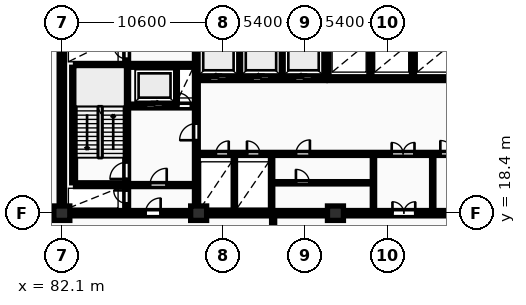
"""IFC4 building model, lengths in metres.
Left out: names, types, materials, properties, quantities, classifications, styles, units other than length and angle.
Written with IfcOpenShell. Run it as: python <this file> out.ifc"""

import sys

from ifc_helpers import new_model, si_unit, direction, frame, frame_2d, origin, origin_2d, place, context, subcontext, project, spatial, rectangle, extrude, element, fill, save


model = new_model("IFC4")
c1 = context("Model", 3, precision=1e-05, world=origin(), true_north=direction((0.0, 1.0)))
c2 = subcontext(c1, "Body", "Model", "MODEL_VIEW")
j1 = project(units=[si_unit("LENGTHUNIT", "METRE"), si_unit("PLANEANGLEUNIT", "RADIAN")], contexts=[c1])
p1 = place(None, origin())
s1 = spatial("IfcSite", under=j1, at=p1, CompositionType="ELEMENT")
p2 = place(p1, origin())
s2 = spatial("IfcBuilding", under=s1, at=p2, CompositionType="ELEMENT")
p3 = place(p2, frame((0.0, 0.0, 5.4)))
s3 = spatial("IfcBuildingStorey", under=s2, at=p3, CompositionType="ELEMENT", Elevation=5.4)
for number, where, z_axis, x_axis in (
    (1, (82.1, 18.4, 0.0), (0.0, 0.0, 1.0), (1.0, 0.0, 0.0)),
    (2, (91.1, 18.4, 0.0), (0.0, 0.0, 1.0), (1.0, 0.0, 0.0)),
    (3, (100.1, 18.4, 0.0), (0.0, 0.0, 1.0), (1.0, 0.0, 0.0)),
):
    element("IfcColumn", number, at=place(p3, frame(where, z_axis=z_axis, x_axis=x_axis)), inside=s3, PredefinedType="COLUMN", context=c2, shape_type="SweptSolid", body=[
        extrude(rectangle(XDim=1.05, YDim=0.95, at=origin_2d()), origin(), (0.0, 0.0, 1.0), 4.6),
    ])
p4 = place(p3, frame((82.1, 18.575, 0.0), z_axis=(0.0, 0.0, 1.0), x_axis=(0.0, 1.0, 0.0)))
e4 = element("IfcWall", 4, at=p4, inside=s3, PredefinedType="SHEAR", context=c2, shape_type="SweptSolid", body=[
    extrude(rectangle(XDim=11.65, YDim=0.35, at=frame_2d((5.825, 0.0))), origin(), (0.0, 0.0, 1.0), 4.6),
])
p5 = place(p3, frame((81.925, 18.4, 0.0), z_axis=(0.0, 0.0, 1.0), x_axis=(1.0, 0.0, 0.0)))
e5 = element("IfcWall", 5, at=p5, inside=s3, PredefinedType="SHEAR", context=c2, shape_type="SweptSolid", body=[
    extrude(rectangle(XDim=36.265, YDim=0.35, at=frame_2d((18.132, 0.0))), origin(), (0.0, 0.0, 1.0), 4.6),
])
p6 = place(p5, frame((5.675, 0.0, 0.0)))
e6 = element("IfcOpeningElement", 6, at=p6, cuts=e5, PredefinedType="OPENING", context=c2, shape_type="SweptSolid", body=[
    extrude(rectangle(XDim=1.0, YDim=2.15, at=frame_2d((0.5, 1.075))), frame((0.0, 0.185, 0.0), z_axis=(0.0, -1.0, 0.0), x_axis=(1.0, 0.0, 0.0)), (0.0, 0.0, 1.0), 0.37),
])
p7 = place(p5, frame((21.925, 0.0, 0.0)))
e7 = element("IfcOpeningElement", 7, at=p7, cuts=e5, PredefinedType="OPENING", context=c2, shape_type="SweptSolid", body=[
    extrude(rectangle(XDim=1.5, YDim=2.2, at=frame_2d((0.75, 1.1))), frame((0.0, 0.185, 0.0), z_axis=(0.0, -1.0, 0.0), x_axis=(1.0, 0.0, 0.0)), (0.0, 0.0, 1.0), 0.37),
])
p8 = place(p5, frame((29.875, 0.0, 0.0)))
e8 = element("IfcOpeningElement", 8, at=p8, cuts=e5, PredefinedType="OPENING", context=c2, shape_type="SweptSolid", body=[
    extrude(rectangle(XDim=1.0, YDim=2.15, at=frame_2d((0.5, 1.075))), frame((0.0, 0.185, 0.0), z_axis=(0.0, -1.0, 0.0), x_axis=(1.0, 0.0, 0.0)), (0.0, 0.0, 1.0), 0.37),
])
p9 = place(p3, frame((82.875, 20.4, 0.0), z_axis=(0.0, 0.0, 1.0), x_axis=(0.0, 1.0, 0.0)))
e9 = element("IfcWall", 9, at=p9, inside=s3, PredefinedType="SHEAR", context=c2, shape_type="SweptSolid", body=[
    extrude(rectangle(XDim=7.6, YDim=0.25, at=frame_2d((3.8, 0.0))), origin(), (0.0, 0.0, 1.0), 4.6),
])
p10 = place(p3, frame((86.365, 18.6, 0.0), z_axis=(0.0, 0.0, 1.0), x_axis=(0.0, 1.0, 0.0)))
e10 = element("IfcWall", 10, at=p10, inside=s3, PredefinedType="SHEAR", context=c2, shape_type="SweptSolid", body=[
    extrude(rectangle(XDim=11.6, YDim=0.25, at=frame_2d((5.8, 0.0))), origin(), (0.0, 0.0, 1.0), 4.6),
])
p11 = place(p10, frame((0.45, 0.0, 0.0)))
e11 = element("IfcOpeningElement", 11, at=p11, cuts=e10, PredefinedType="OPENING", context=c2, shape_type="SweptSolid", body=[
    extrude(rectangle(XDim=0.85, YDim=2.05, at=frame_2d((0.425, 1.025))), frame((0.0, 0.135, 0.0), z_axis=(0.0, -1.0, 0.0), x_axis=(1.0, 0.0, 0.0)), (0.0, 0.0, 1.0), 0.27),
])
p12 = place(p10, frame((2.05, 0.0, 0.0)))
e12 = element("IfcOpeningElement", 12, at=p12, cuts=e10, PredefinedType="OPENING", context=c2, shape_type="SweptSolid", body=[
    extrude(rectangle(XDim=1.1, YDim=2.1, at=frame_2d((0.55, 1.05))), frame((0.0, 0.135, 0.0), z_axis=(0.0, -1.0, 0.0), x_axis=(1.0, 0.0, 0.0)), (0.0, 0.0, 1.0), 0.27),
])
p13 = place(p10, frame((9.95, 0.0, 0.0)))
e13 = element("IfcOpeningElement", 13, at=p13, cuts=e10, PredefinedType="OPENING", context=c2, shape_type="SweptSolid", body=[
    extrude(rectangle(XDim=0.85, YDim=2.05, at=frame_2d((0.425, 1.025))), frame((0.0, 0.135, 0.0), z_axis=(0.0, -1.0, 0.0), x_axis=(1.0, 0.0, 0.0)), (0.0, 0.0, 1.0), 0.27),
])
p14 = place(p3, frame((83.0, 20.275, 0.0), z_axis=(0.0, 0.0, 1.0), x_axis=(1.0, 0.0, 0.0)))
e14 = element("IfcWall", 14, at=p14, inside=s3, PredefinedType="SHEAR", context=c2, shape_type="SweptSolid", body=[
    extrude(rectangle(XDim=3.24, YDim=0.25, at=frame_2d((1.62, 0.0))), origin(), (0.0, 0.0, 1.0), 4.6),
])
p15 = place(p3, frame((83.0, 28.125, 0.0), z_axis=(0.0, 0.0, 1.0), x_axis=(1.0, 0.0, 0.0)))
e15 = element("IfcWall", 15, at=p15, inside=s3, PredefinedType="SHEAR", context=c2, shape_type="SweptSolid", body=[
    extrude(rectangle(XDim=7.82, YDim=0.25, at=frame_2d((3.91, 0.0))), origin(), (0.0, 0.0, 1.0), 4.6),
])
p16 = place(p3, frame((86.5, 25.45, 0.0), z_axis=(0.0, 0.0, 1.0), x_axis=(1.0, 0.0, 0.0)))
e16 = element("IfcWall", 16, at=p16, inside=s3, PredefinedType="SHEAR", context=c2, shape_type="SweptSolid", body=[
    extrude(rectangle(XDim=4.32, YDim=0.25, at=frame_2d((2.16, 0.0))), origin(), (0.0, 0.0, 1.0), 4.6),
])
p17 = place(p16, frame((1.14, 0.0, 0.0)))
e17 = element("IfcOpeningElement", 17, at=p17, cuts=e16, PredefinedType="OPENING", context=c2, shape_type="SweptSolid", body=[
    extrude(rectangle(XDim=1.12, YDim=2.12, at=frame_2d((0.56, 1.06))), frame((0.0, 0.135, 0.0), z_axis=(0.0, -1.0, 0.0), x_axis=(1.0, 0.0, 0.0)), (0.0, 0.0, 1.0), 0.27),
])
p18 = place(p16, frame((3.25, 0.0, 0.0)))
e18 = element("IfcOpeningElement", 18, at=p18, cuts=e16, PredefinedType="OPENING", context=c2, shape_type="SweptSolid", body=[
    extrude(rectangle(XDim=0.85, YDim=2.05, at=frame_2d((0.425, 1.025))), frame((0.0, 0.135, 0.0), z_axis=(0.0, -1.0, 0.0), x_axis=(1.0, 0.0, 0.0)), (0.0, 0.0, 1.0), 0.27),
])
p19 = place(p3, frame((89.6, 25.58, 0.0), z_axis=(0.0, 0.0, 1.0), x_axis=(0.0, 1.0, 0.0)))
e19 = element("IfcWall", 19, at=p19, inside=s3, PredefinedType="PARTITIONING", context=c2, shape_type="SweptSolid", body=[
    extrude(rectangle(XDim=2.42, YDim=0.2, at=frame_2d((1.21, 0.0))), origin(), (0.0, 0.0, 1.0), 4.3),
])
p20 = place(p3, frame((86.5, 20.25, 0.0), z_axis=(0.0, 0.0, 1.0), x_axis=(1.0, 0.0, 0.0)))
e20 = element("IfcWall", 20, at=p20, inside=s3, PredefinedType="PARTITIONING", context=c2, shape_type="SweptSolid", body=[
    extrude(rectangle(XDim=4.32, YDim=0.2, at=frame_2d((2.16, 0.0))), origin(), (0.0, 0.0, 1.0), 4.3),
])
p21 = place(p20, frame((1.4, 0.0, 0.0)))
e21 = element("IfcOpeningElement", 21, at=p21, cuts=e20, PredefinedType="OPENING", context=c2, shape_type="SweptSolid", body=[
    extrude(rectangle(XDim=1.1, YDim=2.1, at=frame_2d((0.55, 1.05))), frame((0.0, 0.11, 0.0), z_axis=(0.0, -1.0, 0.0), x_axis=(1.0, 0.0, 0.0)), (0.0, 0.0, 1.0), 0.22),
])
p22 = place(p3, frame((90.95, 18.6, 0.0), z_axis=(0.0, 0.0, 1.0), x_axis=(0.0, 1.0, 0.0)))
e22 = element("IfcWall", 22, at=p22, inside=s3, PredefinedType="SHEAR", context=c2, shape_type="SweptSolid", body=[
    extrude(rectangle(XDim=11.6, YDim=0.25, at=frame_2d((5.8, 0.0))), origin(), (0.0, 0.0, 1.0), 4.6),
])
p23 = place(p22, frame((4.6, 0.0, 0.0)))
e23 = element("IfcOpeningElement", 23, at=p23, cuts=e22, PredefinedType="OPENING", context=c2, shape_type="SweptSolid", body=[
    extrude(rectangle(XDim=1.1, YDim=2.1, at=frame_2d((0.55, 1.05))), frame((0.0, 0.135, 0.0), z_axis=(0.0, -1.0, 0.0), x_axis=(1.0, 0.0, 0.0)), (0.0, 0.0, 1.0), 0.27),
])
for number, where, z_axis, x_axis in (
    (24, (93.8, 27.38, 0.0), (0.0, 0.0, 1.0), (0.0, 1.0, 0.0)),
    (25, (96.6, 27.38, 0.0), (0.0, 0.0, 1.0), (0.0, 1.0, 0.0)),
):
    element("IfcWall", number, at=place(p3, frame(where, z_axis=z_axis, x_axis=x_axis)), inside=s3, PredefinedType="PARTITIONING", context=c2, shape_type="SweptSolid", body=[
        extrude(rectangle(XDim=2.82, YDim=0.2, at=frame_2d((1.41, 0.0))), origin(), (0.0, 0.0, 1.0), 4.3),
    ])
p24 = place(p3, frame((91.08, 27.25, 0.0), z_axis=(0.0, 0.0, 1.0), x_axis=(1.0, 0.0, 0.0)))
e26 = element("IfcWall", 26, at=p24, inside=s3, PredefinedType="SHEAR", context=c2, shape_type="SweptSolid", body=[
    extrude(rectangle(XDim=8.34, YDim=0.25, at=frame_2d((4.17, 0.0))), origin(), (0.0, 0.0, 1.0), 4.6),
])
p25 = place(p24, frame((0.76, 0.0, 0.0)))
e27 = element("IfcOpeningElement", 27, at=p25, cuts=e26, PredefinedType="OPENING", context=c2, shape_type="SweptSolid", body=[
    extrude(rectangle(XDim=1.12, YDim=2.12, at=frame_2d((0.56, 1.06))), frame((0.0, 0.135, 0.0), z_axis=(0.0, -1.0, 0.0), x_axis=(1.0, 0.0, 0.0)), (0.0, 0.0, 1.0), 0.27),
])
p26 = place(p24, frame((3.56, 0.0, 0.0)))
e28 = element("IfcOpeningElement", 28, at=p26, cuts=e26, PredefinedType="OPENING", context=c2, shape_type="SweptSolid", body=[
    extrude(rectangle(XDim=1.12, YDim=2.12, at=frame_2d((0.56, 1.06))), frame((0.0, 0.135, 0.0), z_axis=(0.0, -1.0, 0.0), x_axis=(1.0, 0.0, 0.0)), (0.0, 0.0, 1.0), 0.27),
])
p27 = place(p24, frame((6.36, 0.0, 0.0)))
e29 = element("IfcOpeningElement", 29, at=p27, cuts=e26, PredefinedType="OPENING", context=c2, shape_type="SweptSolid", body=[
    extrude(rectangle(XDim=1.12, YDim=2.12, at=frame_2d((0.56, 1.06))), frame((0.0, 0.135, 0.0), z_axis=(0.0, -1.0, 0.0), x_axis=(1.0, 0.0, 0.0)), (0.0, 0.0, 1.0), 0.27),
])
p28 = place(p3, frame((99.55, 27.25, 0.0), z_axis=(0.0, 0.0, 1.0), x_axis=(0.0, 1.0, 0.0)))
e30 = element("IfcWall", 30, at=p28, inside=s3, PredefinedType="SHEAR", context=c2, shape_type="SweptSolid", body=[
    extrude(rectangle(XDim=2.95, YDim=0.25, at=frame_2d((1.475, 0.0))), origin(), (0.0, 0.0, 1.0), 4.6),
])
for number, where, z_axis, x_axis in (
    (31, (102.4, 27.38, 0.0), (0.0, 0.0, 1.0), (0.0, 1.0, 0.0)),
    (32, (105.2, 27.38, 0.0), (0.0, 0.0, 1.0), (0.0, 1.0, 0.0)),
):
    element("IfcWall", number, at=place(p3, frame(where, z_axis=z_axis, x_axis=x_axis)), inside=s3, PredefinedType="PARTITIONING", context=c2, shape_type="SweptSolid", body=[
        extrude(rectangle(XDim=2.82, YDim=0.2, at=frame_2d((1.41, 0.0))), origin(), (0.0, 0.0, 1.0), 4.3),
    ])
p29 = place(p3, frame((99.68, 27.25, 0.0), z_axis=(0.0, 0.0, 1.0), x_axis=(1.0, 0.0, 0.0)))
e33 = element("IfcWall", 33, at=p29, inside=s3, PredefinedType="SHEAR", context=c2, shape_type="SweptSolid", body=[
    extrude(rectangle(XDim=10.54, YDim=0.25, at=frame_2d((5.27, 0.0))), origin(), (0.0, 0.0, 1.0), 4.6),
])
p30 = place(p29, frame((8.92, 0.0, 0.0)))
e34 = element("IfcOpeningElement", 34, at=p30, cuts=e33, PredefinedType="OPENING", context=c2, shape_type="SweptSolid", body=[
    extrude(rectangle(XDim=0.85, YDim=2.05, at=frame_2d((0.425, 1.025))), frame((0.0, 0.135, 0.0), z_axis=(0.0, -1.0, 0.0), x_axis=(1.0, 0.0, 0.0)), (0.0, 0.0, 1.0), 0.27),
])
for number, where, z_axis, x_axis in (
    (35, (93.45, 18.6, 0.0), (0.0, 0.0, 1.0), (0.0, 1.0, 0.0)),
    (36, (95.9, 18.6, 0.0), (0.0, 0.0, 1.0), (0.0, 1.0, 0.0)),
):
    element("IfcWall", number, at=place(p3, frame(where, z_axis=z_axis, x_axis=x_axis)), inside=s3, PredefinedType="PARTITIONING", context=c2, shape_type="SweptSolid", body=[
        extrude(rectangle(XDim=3.6, YDim=0.15, at=frame_2d((1.8, 0.0))), origin(), (0.0, 0.0, 1.0), 4.3),
    ])
p31 = place(p3, frame((95.9, 20.4, 0.0), z_axis=(0.0, 0.0, 1.0), x_axis=(1.0, 0.0, 0.0)))
e37 = element("IfcWall", 37, at=p31, inside=s3, PredefinedType="PARTITIONING", context=c2, shape_type="SweptSolid", body=[
    extrude(rectangle(XDim=6.7, YDim=0.15, at=frame_2d((3.35, 0.0))), origin(), (0.0, 0.0, 1.0), 4.3),
])
p32 = place(p31, frame((1.6, 0.0, 0.0)))
e38 = element("IfcOpeningElement", 38, at=p32, cuts=e37, PredefinedType="OPENING", context=c2, shape_type="SweptSolid", body=[
    extrude(rectangle(XDim=0.88, YDim=2.06, at=frame_2d((0.44, 1.03))), frame((0.0, 0.085, 0.0), z_axis=(0.0, -1.0, 0.0), x_axis=(1.0, 0.0, 0.0)), (0.0, 0.0, 1.0), 0.17),
])
for number, where, z_axis, x_axis in (
    (39, (102.6, 18.6, 0.0), (0.0, 0.0, 1.0), (0.0, 1.0, 0.0)),
    (40, (106.5, 18.6, 0.0), (0.0, 0.0, 1.0), (0.0, 1.0, 0.0)),
):
    element("IfcWall", number, at=place(p3, frame(where, z_axis=z_axis, x_axis=x_axis)), inside=s3, PredefinedType="PARTITIONING", context=c2, shape_type="SweptSolid", body=[
        extrude(rectangle(XDim=3.6, YDim=0.15, at=frame_2d((1.8, 0.0))), origin(), (0.0, 0.0, 1.0), 4.3),
    ])
p33 = place(p3, frame((91.08, 22.3, 0.0), z_axis=(0.0, 0.0, 1.0), x_axis=(1.0, 0.0, 0.0)))
e41 = element("IfcWall", 41, at=p33, inside=s3, PredefinedType="PARTITIONING", context=c2, shape_type="SweptSolid", body=[
    extrude(rectangle(XDim=19.14, YDim=0.2, at=frame_2d((9.57, 0.0))), origin(), (0.0, 0.0, 1.0), 4.3),
])
p34 = place(p33, frame((1.15, 0.0, 0.0)))
e42 = element("IfcOpeningElement", 42, at=p34, cuts=e41, PredefinedType="OPENING", context=c2, shape_type="SweptSolid", body=[
    extrude(rectangle(XDim=0.85, YDim=2.05, at=frame_2d((0.425, 1.025))), frame((0.0, 0.11, 0.0), z_axis=(0.0, -1.0, 0.0), x_axis=(1.0, 0.0, 0.0)), (0.0, 0.0, 1.0), 0.22),
])
p35 = place(p33, frame((3.2, 0.0, 0.0)))
e43 = element("IfcOpeningElement", 43, at=p35, cuts=e41, PredefinedType="OPENING", context=c2, shape_type="SweptSolid", body=[
    extrude(rectangle(XDim=0.85, YDim=2.05, at=frame_2d((0.425, 1.025))), frame((0.0, 0.11, 0.0), z_axis=(0.0, -1.0, 0.0), x_axis=(1.0, 0.0, 0.0)), (0.0, 0.0, 1.0), 0.22),
])
p36 = place(p33, frame((12.72, 0.0, 0.0)))
e44 = element("IfcOpeningElement", 44, at=p36, cuts=e41, PredefinedType="OPENING", context=c2, shape_type="SweptSolid", body=[
    extrude(rectangle(XDim=1.5, YDim=2.2, at=frame_2d((0.75, 1.1))), frame((0.0, 0.11, 0.0), z_axis=(0.0, -1.0, 0.0), x_axis=(1.0, 0.0, 0.0)), (0.0, 0.0, 1.0), 0.22),
])
p37 = place(p33, frame((6.42, 0.0, 0.0)))
e45 = element("IfcOpeningElement", 45, at=p37, cuts=e41, PredefinedType="OPENING", context=c2, shape_type="SweptSolid", body=[
    extrude(rectangle(XDim=0.92, YDim=2.08, at=frame_2d((0.46, 1.04))), frame((0.0, 0.11, 0.0), z_axis=(0.0, -1.0, 0.0), x_axis=(1.0, 0.0, 0.0)), (0.0, 0.0, 1.0), 0.22),
])
p38 = place(p33, frame((15.92, 0.0, 0.0)))
e46 = element("IfcOpeningElement", 46, at=p38, cuts=e41, PredefinedType="OPENING", context=c2, shape_type="SweptSolid", body=[
    extrude(rectangle(XDim=0.88, YDim=2.06, at=frame_2d((0.44, 1.03))), frame((0.0, 0.11, 0.0), z_axis=(0.0, -1.0, 0.0), x_axis=(1.0, 0.0, 0.0)), (0.0, 0.0, 1.0), 0.22),
])
p39 = place(p3, frame((96.0, -23.2, 0.0), z_axis=(0.0, 0.0, 1.0), x_axis=(0.0, 1.0, 0.0)))
e47 = element("IfcWall", 47, at=p39, inside=s3, PredefinedType="PARTITIONING", context=c2, shape_type="SweptSolid", body=[
    extrude(rectangle(XDim=41.45, YDim=0.2, at=frame_2d((20.725, 0.0))), origin(), (0.0, 0.0, 1.0), 4.3),
])
p40 = place(p39, frame((9.5, 0.0, 0.0)))
e48 = element("IfcOpeningElement", 48, at=p40, cuts=e47, PredefinedType="OPENING", context=c2, shape_type="SweptSolid", body=[
    extrude(rectangle(XDim=1.22, YDim=2.18, at=frame_2d((0.61, 1.09))), frame((0.0, 0.11, 0.0), z_axis=(0.0, -1.0, 0.0), x_axis=(1.0, 0.0, 0.0)), (0.0, 0.0, 1.0), 0.22),
])
p41 = place(p6, origin())
e49 = element("IfcDoor", 49, at=p41, inside=s3, OperationType="SINGLE_SWING_RIGHT", PredefinedType="DOOR", context=c2, shape_type="SweptSolid", body=[
    extrude(rectangle(XDim=1.0, YDim=2.15, at=frame_2d((0.5, 1.075))), frame((0.0, 0.025, 0.0), z_axis=(0.0, -1.0, 0.0), x_axis=(1.0, 0.0, 0.0)), (0.0, 0.0, 1.0), 0.05),
])
fill(e6, e49)
p42 = place(p7, origin())
e50 = element("IfcDoor", 50, at=p42, inside=s3, OperationType="DOUBLE_DOOR_SINGLE_SWING", PredefinedType="DOOR", context=c2, shape_type="SweptSolid", body=[
    extrude(rectangle(XDim=1.5, YDim=2.2, at=frame_2d((0.75, 1.1))), frame((0.0, 0.025, 0.0), z_axis=(0.0, -1.0, 0.0), x_axis=(1.0, 0.0, 0.0)), (0.0, 0.0, 1.0), 0.05),
])
fill(e7, e50)
p43 = place(p11, origin())
e51 = element("IfcDoor", 51, at=p43, inside=s3, OperationType="SINGLE_SWING_RIGHT", PredefinedType="DOOR", context=c2, shape_type="SweptSolid", body=[
    extrude(rectangle(XDim=0.85, YDim=2.05, at=frame_2d((0.425, 1.025))), frame((0.0, 0.025, 0.0), z_axis=(0.0, -1.0, 0.0), x_axis=(1.0, 0.0, 0.0)), (0.0, 0.0, 1.0), 0.05),
])
fill(e11, e51)
p44 = place(p12, origin())
e52 = element("IfcDoor", 52, at=p44, inside=s3, OperationType="SINGLE_SWING_LEFT", PredefinedType="DOOR", context=c2, shape_type="SweptSolid", body=[
    extrude(rectangle(XDim=1.1, YDim=2.1, at=frame_2d((0.55, 1.05))), frame((0.0, 0.025, 0.0), z_axis=(0.0, -1.0, 0.0), x_axis=(1.0, 0.0, 0.0)), (0.0, 0.0, 1.0), 0.05),
])
fill(e12, e52)
p45 = place(p13, origin())
e53 = element("IfcDoor", 53, at=p45, inside=s3, OperationType="SINGLE_SWING_RIGHT", PredefinedType="DOOR", context=c2, shape_type="SweptSolid", body=[
    extrude(rectangle(XDim=0.85, YDim=2.05, at=frame_2d((0.425, 1.025))), frame((0.0, 0.025, 0.0), z_axis=(0.0, -1.0, 0.0), x_axis=(1.0, 0.0, 0.0)), (0.0, 0.0, 1.0), 0.05),
])
fill(e13, e53)
p46 = place(p17, origin())
e54 = element("IfcDoor", 54, at=p46, inside=s3, OperationType="SLIDING_TO_RIGHT", PredefinedType="DOOR", context=c2, shape_type="SweptSolid", body=[
    extrude(rectangle(XDim=1.12, YDim=2.12, at=frame_2d((0.56, 1.06))), frame((0.0, 0.025, 0.0), z_axis=(0.0, -1.0, 0.0), x_axis=(1.0, 0.0, 0.0)), (0.0, 0.0, 1.0), 0.05),
])
fill(e17, e54)
p47 = place(p18, origin())
e55 = element("IfcDoor", 55, at=p47, inside=s3, OperationType="SINGLE_SWING_LEFT", PredefinedType="DOOR", context=c2, shape_type="SweptSolid", body=[
    extrude(rectangle(XDim=0.85, YDim=2.05, at=frame_2d((0.425, 1.025))), frame((0.0, 0.025, 0.0), z_axis=(0.0, -1.0, 0.0), x_axis=(1.0, 0.0, 0.0)), (0.0, 0.0, 1.0), 0.05),
])
fill(e18, e55)
p48 = place(p21, origin())
e56 = element("IfcDoor", 56, at=p48, inside=s3, OperationType="SINGLE_SWING_RIGHT", PredefinedType="DOOR", context=c2, shape_type="SweptSolid", body=[
    extrude(rectangle(XDim=1.1, YDim=2.1, at=frame_2d((0.55, 1.05))), frame((0.0, 0.025, 0.0), z_axis=(0.0, -1.0, 0.0), x_axis=(1.0, 0.0, 0.0)), (0.0, 0.0, 1.0), 0.05),
])
fill(e21, e56)
p49 = place(p23, origin())
e57 = element("IfcDoor", 57, at=p49, inside=s3, OperationType="SINGLE_SWING_LEFT", PredefinedType="DOOR", context=c2, shape_type="SweptSolid", body=[
    extrude(rectangle(XDim=1.1, YDim=2.1, at=frame_2d((0.55, 1.05))), frame((0.0, 0.025, 0.0), z_axis=(0.0, -1.0, 0.0), x_axis=(1.0, 0.0, 0.0)), (0.0, 0.0, 1.0), 0.05),
])
fill(e23, e57)
p50 = place(p25, origin())
e58 = element("IfcDoor", 58, at=p50, inside=s3, OperationType="SLIDING_TO_LEFT", PredefinedType="DOOR", context=c2, shape_type="SweptSolid", body=[
    extrude(rectangle(XDim=1.12, YDim=2.12, at=frame_2d((0.56, 1.06))), frame((0.0, 0.025, 0.0), z_axis=(0.0, -1.0, 0.0), x_axis=(1.0, 0.0, 0.0)), (0.0, 0.0, 1.0), 0.05),
])
fill(e27, e58)
p51 = place(p26, origin())
e59 = element("IfcDoor", 59, at=p51, inside=s3, OperationType="SLIDING_TO_LEFT", PredefinedType="DOOR", context=c2, shape_type="SweptSolid", body=[
    extrude(rectangle(XDim=1.12, YDim=2.12, at=frame_2d((0.56, 1.06))), frame((0.0, 0.025, 0.0), z_axis=(0.0, -1.0, 0.0), x_axis=(1.0, 0.0, 0.0)), (0.0, 0.0, 1.0), 0.05),
])
fill(e28, e59)
p52 = place(p27, origin())
e60 = element("IfcDoor", 60, at=p52, inside=s3, OperationType="SLIDING_TO_LEFT", PredefinedType="DOOR", context=c2, shape_type="SweptSolid", body=[
    extrude(rectangle(XDim=1.12, YDim=2.12, at=frame_2d((0.56, 1.06))), frame((0.0, 0.025, 0.0), z_axis=(0.0, -1.0, 0.0), x_axis=(1.0, 0.0, 0.0)), (0.0, 0.0, 1.0), 0.05),
])
fill(e29, e60)
p53 = place(p32, origin())
e61 = element("IfcDoor", 61, at=p53, inside=s3, OperationType="SINGLE_SWING_LEFT", PredefinedType="DOOR", context=c2, shape_type="SweptSolid", body=[
    extrude(rectangle(XDim=0.88, YDim=2.06, at=frame_2d((0.44, 1.03))), frame((0.0, 0.025, 0.0), z_axis=(0.0, -1.0, 0.0), x_axis=(1.0, 0.0, 0.0)), (0.0, 0.0, 1.0), 0.05),
])
fill(e38, e61)
p54 = place(p34, origin())
e62 = element("IfcDoor", 62, at=p54, inside=s3, OperationType="SINGLE_SWING_RIGHT", PredefinedType="DOOR", context=c2, shape_type="SweptSolid", body=[
    extrude(rectangle(XDim=0.85, YDim=2.05, at=frame_2d((0.425, 1.025))), frame((0.0, 0.025, 0.0), z_axis=(0.0, -1.0, 0.0), x_axis=(1.0, 0.0, 0.0)), (0.0, 0.0, 1.0), 0.05),
])
fill(e42, e62)
p55 = place(p35, origin())
e63 = element("IfcDoor", 63, at=p55, inside=s3, OperationType="SINGLE_SWING_LEFT", PredefinedType="DOOR", context=c2, shape_type="SweptSolid", body=[
    extrude(rectangle(XDim=0.85, YDim=2.05, at=frame_2d((0.425, 1.025))), frame((0.0, 0.025, 0.0), z_axis=(0.0, -1.0, 0.0), x_axis=(1.0, 0.0, 0.0)), (0.0, 0.0, 1.0), 0.05),
])
fill(e43, e63)
p56 = place(p36, origin())
e64 = element("IfcDoor", 64, at=p56, inside=s3, OperationType="DOUBLE_DOOR_SINGLE_SWING", PredefinedType="DOOR", context=c2, shape_type="SweptSolid", body=[
    extrude(rectangle(XDim=1.5, YDim=2.2, at=frame_2d((0.75, 1.1))), frame((0.0, 0.025, 0.0), z_axis=(0.0, -1.0, 0.0), x_axis=(1.0, 0.0, 0.0)), (0.0, 0.0, 1.0), 0.05),
])
fill(e44, e64)
p57 = place(p37, origin())
e65 = element("IfcDoor", 65, at=p57, inside=s3, OperationType="SINGLE_SWING_RIGHT", PredefinedType="DOOR", context=c2, shape_type="SweptSolid", body=[
    extrude(rectangle(XDim=0.92, YDim=2.08, at=frame_2d((0.46, 1.04))), frame((0.0, 0.025, 0.0), z_axis=(0.0, -1.0, 0.0), x_axis=(1.0, 0.0, 0.0)), (0.0, 0.0, 1.0), 0.05),
])
fill(e45, e65)
p58 = place(p38, origin())
e66 = element("IfcDoor", 66, at=p58, inside=s3, OperationType="SINGLE_SWING_LEFT", PredefinedType="DOOR", context=c2, shape_type="SweptSolid", body=[
    extrude(rectangle(XDim=0.88, YDim=2.06, at=frame_2d((0.44, 1.03))), frame((0.0, 0.025, 0.0), z_axis=(0.0, -1.0, 0.0), x_axis=(1.0, 0.0, 0.0)), (0.0, 0.0, 1.0), 0.05),
])
fill(e46, e66)
save(model, sys.argv[1])
